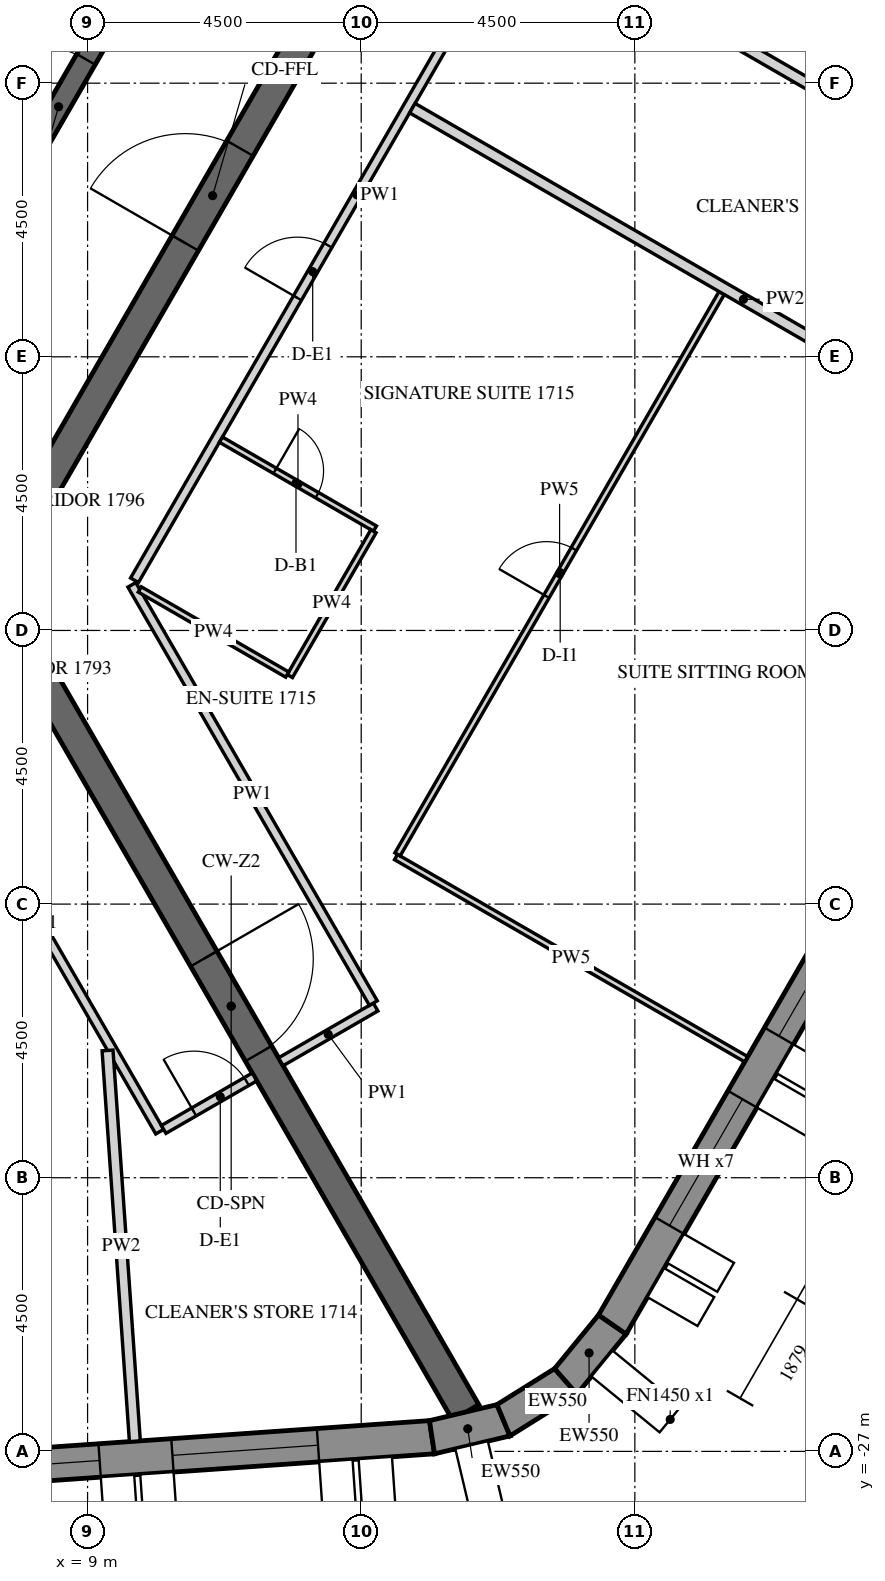
"""IFC4 building model, lengths in metres.
Left out: names, types, materials, properties, quantities, classifications, styles, units other than length and angle.
Written with IfcOpenShell. Run it as: python <this file> out.ifc"""

import sys

from ifc_helpers import new_model, si_unit, direction, frame, frame_2d, origin, place, context, subcontext, project, spatial, polyline, rectangle, outline, extrude, element, fill, save


model = new_model("IFC4")
c1 = context("Model", 3, precision=1e-05, world=origin(), true_north=direction((0.0, 1.0)))
c2 = subcontext(c1, "Body", "Model", "MODEL_VIEW")
j1 = project(units=[si_unit("LENGTHUNIT", "METRE"), si_unit("PLANEANGLEUNIT", "RADIAN")], contexts=[c1])
p1 = place(None, origin())
s1 = spatial("IfcSite", under=j1, at=p1, CompositionType="ELEMENT")
p2 = place(p1, origin())
s2 = spatial("IfcBuilding", under=s1, at=p2, CompositionType="ELEMENT")
p3 = place(p2, frame((0.0, 0.0, 215.1)))
s3 = spatial("IfcBuildingStorey", under=s2, at=p3, CompositionType="ELEMENT", Elevation=215.1)
p4 = place(p3, frame((-13.026, -28.704, -0.15), z_axis=(0.0, 0.0, 1.0), x_axis=(0.99756406806, 0.069756219185, 0.0)))
e1 = element("IfcWall", 1, at=p4, inside=s3, PredefinedType="SOLIDWALL", context=c2, shape_type="SweptSolid", body=[
    extrude(outline(polyline([(-0.026, -0.275), (27.78, -0.275), (27.735, 0.275), (0.026, 0.275), (-0.026, -0.275)])), origin(), (0.0, 0.0, 1.0), 3.9),
])
p5 = place(p4, frame((1.879, 0.0, 1.05)))
e2 = element("IfcOpeningElement", 2, at=p5, cuts=e1, PredefinedType="OPENING", context=c2, shape_type="SweptSolid", body=[
    extrude(rectangle(XDim=2.4, YDim=2.4, at=frame_2d((1.2, 1.2))), frame((0.0, 0.285, 0.0), z_axis=(0.0, -1.0, 0.0), x_axis=(1.0, 0.0, 0.0)), (0.0, 0.0, 1.0), 0.57),
])
p6 = place(p4, frame((5.479, 0.0, 1.05)))
e3 = element("IfcOpeningElement", 3, at=p6, cuts=e1, PredefinedType="OPENING", context=c2, shape_type="SweptSolid", body=[
    extrude(rectangle(XDim=2.4, YDim=2.4, at=frame_2d((1.2, 1.2))), frame((0.0, 0.285, 0.0), z_axis=(0.0, -1.0, 0.0), x_axis=(1.0, 0.0, 0.0)), (0.0, 0.0, 1.0), 0.57),
])
p7 = place(p4, frame((9.079, 0.0, 1.05)))
e4 = element("IfcOpeningElement", 4, at=p7, cuts=e1, PredefinedType="OPENING", context=c2, shape_type="SweptSolid", body=[
    extrude(rectangle(XDim=2.4, YDim=2.4, at=frame_2d((1.2, 1.2))), frame((0.0, 0.285, 0.0), z_axis=(0.0, -1.0, 0.0), x_axis=(1.0, 0.0, 0.0)), (0.0, 0.0, 1.0), 0.57),
])
p8 = place(p4, frame((12.679, 0.0, 1.05)))
e5 = element("IfcOpeningElement", 5, at=p8, cuts=e1, PredefinedType="OPENING", context=c2, shape_type="SweptSolid", body=[
    extrude(rectangle(XDim=2.4, YDim=2.4, at=frame_2d((1.2, 1.2))), frame((0.0, 0.285, 0.0), z_axis=(0.0, -1.0, 0.0), x_axis=(1.0, 0.0, 0.0)), (0.0, 0.0, 1.0), 0.57),
])
p9 = place(p4, frame((16.279, 0.0, 1.05)))
e6 = element("IfcOpeningElement", 6, at=p9, cuts=e1, PredefinedType="OPENING", context=c2, shape_type="SweptSolid", body=[
    extrude(rectangle(XDim=2.4, YDim=2.4, at=frame_2d((1.2, 1.2))), frame((0.0, 0.285, 0.0), z_axis=(0.0, -1.0, 0.0), x_axis=(1.0, 0.0, 0.0)), (0.0, 0.0, 1.0), 0.57),
])
p10 = place(p4, frame((19.879, 0.0, 1.05)))
e7 = element("IfcOpeningElement", 7, at=p10, cuts=e1, PredefinedType="OPENING", context=c2, shape_type="SweptSolid", body=[
    extrude(rectangle(XDim=2.4, YDim=2.4, at=frame_2d((1.2, 1.2))), frame((0.0, 0.285, 0.0), z_axis=(0.0, -1.0, 0.0), x_axis=(1.0, 0.0, 0.0)), (0.0, 0.0, 1.0), 0.57),
])
p11 = place(p4, frame((23.479, 0.0, 1.05)))
e8 = element("IfcOpeningElement", 8, at=p11, cuts=e1, PredefinedType="OPENING", context=c2, shape_type="SweptSolid", body=[
    extrude(rectangle(XDim=2.4, YDim=2.4, at=frame_2d((1.2, 1.2))), frame((0.0, 0.285, 0.0), z_axis=(0.0, -1.0, 0.0), x_axis=(1.0, 0.0, 0.0)), (0.0, 0.0, 1.0), 0.57),
])
p12 = place(p3, frame((14.664, -26.767, -0.15), z_axis=(0.0, 0.0, 1.0), x_axis=(0.973063591128, 0.230536868247, 0.0)))
e9 = element("IfcWall", 9, at=p12, inside=s3, PredefinedType="SOLIDWALL", context=c2, shape_type="SweptSolid", body=[
    extrude(outline(polyline([(-0.022, -0.275), (1.253, -0.275), (1.163, 0.275), (0.022, 0.275), (-0.022, -0.275)])), origin(), (0.0, 0.0, 1.0), 3.9),
])
p13 = place(p3, frame((15.84, -26.489, -0.15), z_axis=(0.0, 0.0, 1.0), x_axis=(0.848009655012, 0.52998077796, 0.0)))
e10 = element("IfcWall", 10, at=p13, inside=s3, PredefinedType="SOLIDWALL", context=c2, shape_type="SweptSolid", body=[
    extrude(outline(polyline([(-0.045, -0.275), (1.253, -0.275), (1.163, 0.275), (0.045, 0.275), (-0.045, -0.275)])), origin(), (0.0, 0.0, 1.0), 3.9),
])
p14 = place(p3, frame((16.864, -25.848, -0.15), z_axis=(0.0, 0.0, 1.0), x_axis=(0.633842757806, 0.773461930787, 0.0)))
e11 = element("IfcWall", 11, at=p14, inside=s3, PredefinedType="SOLIDWALL", context=c2, shape_type="SweptSolid", body=[
    extrude(outline(polyline([(-0.045, -0.275), (1.231, -0.275), (1.186, 0.275), (0.045, 0.275), (-0.045, -0.275)])), origin(), (0.0, 0.0, 1.0), 3.9),
])
p15 = place(p3, frame((17.63, -24.914, -0.15), z_axis=(0.0, 0.0, 1.0), x_axis=(0.499998569178, 0.866026229868, 0.0)))
e12 = element("IfcWall", 12, at=p15, inside=s3, PredefinedType="SOLIDWALL", context=c2, shape_type="SweptSolid", body=[
    extrude(outline(polyline([(-0.022, -0.275), (27.783, -0.275), (27.732, 0.275), (0.022, 0.275), (-0.022, -0.275)])), origin(), (0.0, 0.0, 1.0), 3.9),
])
p16 = place(p15, frame((1.879, 0.0, 1.05)))
e13 = element("IfcOpeningElement", 13, at=p16, cuts=e12, PredefinedType="OPENING", context=c2, shape_type="SweptSolid", body=[
    extrude(rectangle(XDim=2.4, YDim=2.4, at=frame_2d((1.2, 1.2))), frame((0.0, 0.285, 0.0), z_axis=(0.0, -1.0, 0.0), x_axis=(1.0, 0.0, 0.0)), (0.0, 0.0, 1.0), 0.57),
])
p17 = place(p15, frame((5.479, 0.0, 1.05)))
e14 = element("IfcOpeningElement", 14, at=p17, cuts=e12, PredefinedType="OPENING", context=c2, shape_type="SweptSolid", body=[
    extrude(rectangle(XDim=2.4, YDim=2.4, at=frame_2d((1.2, 1.2))), frame((0.0, 0.285, 0.0), z_axis=(0.0, -1.0, 0.0), x_axis=(1.0, 0.0, 0.0)), (0.0, 0.0, 1.0), 0.57),
])
p18 = place(p15, frame((9.079, 0.0, 1.05)))
e15 = element("IfcOpeningElement", 15, at=p18, cuts=e12, PredefinedType="OPENING", context=c2, shape_type="SweptSolid", body=[
    extrude(rectangle(XDim=2.4, YDim=2.4, at=frame_2d((1.2, 1.2))), frame((0.0, 0.285, 0.0), z_axis=(0.0, -1.0, 0.0), x_axis=(1.0, 0.0, 0.0)), (0.0, 0.0, 1.0), 0.57),
])
p19 = place(p15, frame((12.679, 0.0, 1.05)))
e16 = element("IfcOpeningElement", 16, at=p19, cuts=e12, PredefinedType="OPENING", context=c2, shape_type="SweptSolid", body=[
    extrude(rectangle(XDim=2.4, YDim=2.4, at=frame_2d((1.2, 1.2))), frame((0.0, 0.285, 0.0), z_axis=(0.0, -1.0, 0.0), x_axis=(1.0, 0.0, 0.0)), (0.0, 0.0, 1.0), 0.57),
])
p20 = place(p15, frame((16.279, 0.0, 1.05)))
e17 = element("IfcOpeningElement", 17, at=p20, cuts=e12, PredefinedType="OPENING", context=c2, shape_type="SweptSolid", body=[
    extrude(rectangle(XDim=2.4, YDim=2.4, at=frame_2d((1.2, 1.2))), frame((0.0, 0.285, 0.0), z_axis=(0.0, -1.0, 0.0), x_axis=(1.0, 0.0, 0.0)), (0.0, 0.0, 1.0), 0.57),
])
p21 = place(p15, frame((19.879, 0.0, 1.05)))
e18 = element("IfcOpeningElement", 18, at=p21, cuts=e12, PredefinedType="OPENING", context=c2, shape_type="SweptSolid", body=[
    extrude(rectangle(XDim=2.4, YDim=2.4, at=frame_2d((1.2, 1.2))), frame((0.0, 0.285, 0.0), z_axis=(0.0, -1.0, 0.0), x_axis=(1.0, 0.0, 0.0)), (0.0, 0.0, 1.0), 0.57),
])
p22 = place(p15, frame((23.479, 0.0, 1.05)))
e19 = element("IfcOpeningElement", 19, at=p22, cuts=e12, PredefinedType="OPENING", context=c2, shape_type="SweptSolid", body=[
    extrude(rectangle(XDim=2.4, YDim=2.4, at=frame_2d((1.2, 1.2))), frame((0.0, 0.285, 0.0), z_axis=(0.0, -1.0, 0.0), x_axis=(1.0, 0.0, 0.0)), (0.0, 0.0, 1.0), 0.57),
])
p23 = place(p3, frame((7.361, -12.75, -0.15), z_axis=(0.0, 0.0, 1.0), x_axis=(0.50000571537, 0.866022103989, 0.0)))
e20 = element("IfcWall", 20, at=p23, inside=s3, PredefinedType="SHEAR", context=c2, shape_type="SweptSolid", body=[
    extrude(outline(polyline([(-0.144, -0.25), (14.867, -0.25), (14.578, 0.25), (0.144, 0.25), (-0.144, -0.25)])), origin(), (0.0, 0.0, 1.0), 3.9),
])
p24 = place(p23, frame((6.49, 0.0, 0.15)))
e21 = element("IfcOpeningElement", 21, at=p24, cuts=e20, PredefinedType="OPENING", context=c2, shape_type="SweptSolid", body=[
    extrude(rectangle(XDim=1.8, YDim=2.4, at=frame_2d((0.9, 1.2))), frame((0.0, 0.26, 0.0), z_axis=(0.0, -1.0, 0.0), x_axis=(1.0, 0.0, 0.0)), (0.0, 0.0, 1.0), 0.52),
])
p25 = place(p3, frame((7.506, -13.0, -0.15), z_axis=(0.0, 0.0, 1.0), x_axis=(0.499988271576, -0.866032175087, 0.0)))
e22 = element("IfcWall", 22, at=p25, inside=s3, PredefinedType="SHEAR", context=c2, shape_type="SweptSolid", body=[
    extrude(rectangle(XDim=15.424, YDim=0.5, at=frame_2d((7.712, 0.0))), origin(), (0.0, 0.0, 1.0), 3.9),
])
p26 = place(p25, frame((6.812, 0.0, 0.15)))
e23 = element("IfcOpeningElement", 23, at=p26, cuts=e22, PredefinedType="OPENING", context=c2, shape_type="SweptSolid", body=[
    extrude(rectangle(XDim=1.8, YDim=2.4, at=frame_2d((0.9, 1.2))), frame((0.0, 0.26, 0.0), z_axis=(0.0, -1.0, 0.0), x_axis=(1.0, 0.0, 0.0)), (0.0, 0.0, 1.0), 0.52),
])
p27 = place(p3, frame((5.673, -9.825, -0.15), z_axis=(0.0, 0.0, 1.0), x_axis=(0.499995046907, 0.866028263435, 0.0)))
e24 = element("IfcWall", 24, at=p27, inside=s3, PredefinedType="SHEAR", context=c2, shape_type="SweptSolid", body=[
    extrude(outline(polyline([(-0.101, -0.175), (11.446, -0.175), (11.244, 0.175), (0.101, 0.175), (-0.101, -0.175)])), origin(), (0.0, 0.0, 1.0), 3.9),
])
p28 = place(p27, frame((4.801, 0.0, 0.15)))
e25 = element("IfcOpeningElement", 25, at=p28, cuts=e24, PredefinedType="OPENING", context=c2, shape_type="SweptSolid", body=[
    extrude(rectangle(XDim=1.8, YDim=2.4, at=frame_2d((0.9, 1.2))), frame((0.0, 0.185, 0.0), z_axis=(0.0, -1.0, 0.0), x_axis=(1.0, 0.0, 0.0)), (0.0, 0.0, 1.0), 0.37),
])
p29 = place(p3, frame((6.221, -14.875, 0.0), z_axis=(0.0, 0.0, 1.0), x_axis=(0.499989830942, -0.866031274813, 0.0)))
e26 = element("IfcWall", 26, at=p29, inside=s3, PredefinedType="PARTITIONING", context=c2, shape_type="SweptSolid", body=[
    extrude(rectangle(XDim=7.93, YDim=0.15, at=frame_2d((3.965, 0.0))), origin(), (0.0, 0.0, 1.0), 2.988),
])
p30 = place(p3, frame((10.251, -21.705, 0.0), z_axis=(0.0, 0.0, 1.0), x_axis=(0.866013532718, 0.500020560727, 0.0)))
e27 = element("IfcWall", 27, at=p30, inside=s3, PredefinedType="PARTITIONING", context=c2, shape_type="SweptSolid", body=[
    extrude(rectangle(XDim=1.725, YDim=0.15, at=frame_2d((0.863, 0.0))), origin(), (0.0, 0.0, 1.0), 2.988),
])
p31 = place(p30, frame((0.575, 0.0, 0.0)))
e28 = element("IfcOpeningElement", 28, at=p31, cuts=e27, PredefinedType="OPENING", context=c2, shape_type="SweptSolid", body=[
    extrude(rectangle(XDim=1.0, YDim=2.1, at=frame_2d((0.5, 1.05))), frame((0.0, 0.085, 0.0), z_axis=(0.0, -1.0, 0.0), x_axis=(1.0, 0.0, 0.0)), (0.0, 0.0, 1.0), 0.17),
])
p32 = place(p3, frame((12.178, -20.593, 0.0), z_axis=(0.0, 0.0, 1.0), x_axis=(0.866047807691, 0.499961193289, 0.0)))
e29 = element("IfcWall", 29, at=p32, inside=s3, PredefinedType="PARTITIONING", context=c2, shape_type="SweptSolid", body=[
    extrude(rectangle(XDim=1.8, YDim=0.15, at=frame_2d((0.9, 0.0))), origin(), (0.0, 0.0, 1.0), 2.988),
])
p33 = place(p3, frame((13.699, -19.628, 0.0), z_axis=(0.0, 0.0, 1.0), x_axis=(-0.499997422768, 0.866026891745, 0.0)))
e30 = element("IfcWall", 30, at=p33, inside=s3, PredefinedType="PARTITIONING", context=c2, shape_type="SweptSolid", body=[
    extrude(rectangle(XDim=7.942, YDim=0.15, at=frame_2d((3.971, 0.0))), origin(), (0.0, 0.0, 1.0), 2.988),
])
p34 = place(p3, frame((9.772, -12.675, 0.0), z_axis=(0.0, 0.0, 1.0), x_axis=(0.499996322767, 0.866027526826, 0.0)))
e31 = element("IfcWall", 31, at=p34, inside=s3, PredefinedType="PARTITIONING", context=c2, shape_type="SweptSolid", body=[
    extrude(rectangle(XDim=14.636, YDim=0.15, at=frame_2d((7.318, 0.0))), origin(), (0.0, 0.0, 1.0), 2.988),
])
p35 = place(p34, frame((5.361, 0.0, 0.0)))
e32 = element("IfcOpeningElement", 32, at=p35, cuts=e31, PredefinedType="OPENING", context=c2, shape_type="SweptSolid", body=[
    extrude(rectangle(XDim=1.0, YDim=2.1, at=frame_2d((0.5, 1.05))), frame((0.0, 0.085, 0.0), z_axis=(0.0, -1.0, 0.0), x_axis=(1.0, 0.0, 0.0)), (0.0, 0.0, 1.0), 0.17),
])
p36 = place(p34, frame((10.309, 0.0, 0.0)))
e33 = element("IfcOpeningElement", 33, at=p36, cuts=e31, PredefinedType="OPENING", context=c2, shape_type="SweptSolid", body=[
    extrude(rectangle(XDim=1.0, YDim=2.1, at=frame_2d((0.5, 1.05))), frame((0.0, 0.085, 0.0), z_axis=(0.0, -1.0, 0.0), x_axis=(1.0, 0.0, 0.0)), (0.0, 0.0, 1.0), 0.17),
])
p37 = place(p34, frame((13.278, 0.0, 0.0)))
e34 = element("IfcOpeningElement", 34, at=p37, cuts=e31, PredefinedType="OPENING", context=c2, shape_type="SweptSolid", body=[
    extrude(rectangle(XDim=1.0, YDim=2.1, at=frame_2d((0.5, 1.05))), frame((0.0, 0.085, 0.0), z_axis=(0.0, -1.0, 0.0), x_axis=(1.0, 0.0, 0.0)), (0.0, 0.0, 1.0), 0.17),
])
p38 = place(p3, frame((9.778, -26.833, 0.0), z_axis=(0.0, 0.0, 1.0), x_axis=(-0.069733334443, 0.997565668048, 0.0)))
e35 = element("IfcWall", 35, at=p38, inside=s3, PredefinedType="PARTITIONING", context=c2, shape_type="SweptSolid", body=[
    extrude(rectangle(XDim=6.442, YDim=0.18, at=frame_2d((3.221, 0.0))), origin(), (0.0, 0.0, 1.0), 2.988),
])
p39 = place(p3, frame((11.193, -10.363, 0.0), z_axis=(0.0, 0.0, 1.0), x_axis=(0.865989585315, -0.500062034277, 0.0)))
e36 = element("IfcWall", 36, at=p39, inside=s3, PredefinedType="PARTITIONING", context=c2, shape_type="SweptSolid", body=[
    extrude(rectangle(XDim=2.925, YDim=0.1, at=frame_2d((1.462, 0.0))), origin(), (0.0, 0.0, 1.0), 2.988),
])
p40 = place(p39, frame((1.025, 0.0, 0.0)))
e37 = element("IfcOpeningElement", 37, at=p40, cuts=e36, PredefinedType="OPENING", context=c2, shape_type="SweptSolid", body=[
    extrude(rectangle(XDim=0.8, YDim=2.1, at=frame_2d((0.4, 1.05))), frame((0.0, 0.06, 0.0), z_axis=(0.0, -1.0, 0.0), x_axis=(1.0, 0.0, 0.0)), (0.0, 0.0, 1.0), 0.12),
])
p41 = place(p3, frame((13.701, -11.868, 0.0), z_axis=(0.0, 0.0, 1.0), x_axis=(-0.499996545922, -0.866027397988, 0.0)))
e38 = element("IfcWall", 38, at=p41, inside=s3, PredefinedType="PARTITIONING", context=c2, shape_type="SweptSolid", body=[
    extrude(rectangle(XDim=2.75, YDim=0.1, at=frame_2d((1.375, 0.0))), origin(), (0.0, 0.0, 1.0), 2.988),
])
p42 = place(p3, frame((12.283, -14.225, 0.0), z_axis=(0.0, 0.0, 1.0), x_axis=(-0.866018616679, 0.500011755427, 0.0)))
e39 = element("IfcWall", 39, at=p42, inside=s3, PredefinedType="PARTITIONING", context=c2, shape_type="SweptSolid", body=[
    extrude(rectangle(XDim=2.8, YDim=0.1, at=frame_2d((1.4, 0.0))), origin(), (0.0, 0.0, 1.0), 2.988),
])
p43 = place(p3, frame((19.831, -20.551, 0.0), z_axis=(0.0, 0.0, 1.0), x_axis=(-0.866027239912, 0.49999681972, 0.0)))
e40 = element("IfcWall", 40, at=p43, inside=s3, PredefinedType="PARTITIONING", context=c2, shape_type="SweptSolid", body=[
    extrude(rectangle(XDim=6.65, YDim=0.1, at=frame_2d((3.325, 0.0))), origin(), (0.0, 0.0, 1.0), 2.988),
])
p44 = place(p3, frame((14.097, -17.183, 0.0), z_axis=(0.0, 0.0, 1.0), x_axis=(0.500001321243, 0.866024640963, 0.0)))
e41 = element("IfcWall", 41, at=p44, inside=s3, PredefinedType="PARTITIONING", context=c2, shape_type="SweptSolid", body=[
    extrude(rectangle(XDim=10.66, YDim=0.1, at=frame_2d((5.33, 0.0))), origin(), (0.0, 0.0, 1.0), 2.988),
])
p45 = place(p44, frame((4.9, 0.0, 0.0)))
e42 = element("IfcOpeningElement", 42, at=p45, cuts=e41, PredefinedType="OPENING", context=c2, shape_type="SweptSolid", body=[
    extrude(rectangle(XDim=0.9, YDim=2.1, at=frame_2d((0.45, 1.05))), frame((0.0, 0.06, 0.0), z_axis=(0.0, -1.0, 0.0), x_axis=(1.0, 0.0, 0.0)), (0.0, 0.0, 1.0), 0.12),
])
p46 = place(p3, frame((25.231, -11.198, 0.0), z_axis=(0.0, 0.0, 1.0), x_axis=(-0.866032662629, 0.499987427101, 0.0)))
e43 = element("IfcWall", 43, at=p46, inside=s3, PredefinedType="PARTITIONING", context=c2, shape_type="SweptSolid", body=[
    extrude(rectangle(XDim=12.575, YDim=0.18, at=frame_2d((6.288, 0.0))), origin(), (0.0, 0.0, 1.0), 2.988),
])
p47 = place(p3, frame((27.031, -8.08, 0.0), z_axis=(0.0, 0.0, 1.0), x_axis=(-0.86602780907, 0.499995833901, 0.0)))
e44 = element("IfcWall", 44, at=p47, inside=s3, PredefinedType="PARTITIONING", context=c2, shape_type="SweptSolid", body=[
    extrude(rectangle(XDim=12.575, YDim=0.18, at=frame_2d((6.287, 0.0))), origin(), (0.0, 0.0, 1.0), 2.988),
])
p48 = place(p10, frame((0.0, 0.205, 0.0)))
e45 = element("IfcWindow", 45, at=p48, inside=s3, PartitioningType="DOUBLE_PANEL_VERTICAL", PredefinedType="WINDOW", context=c2, shape_type="SweptSolid", body=[
    extrude(rectangle(XDim=2.4, YDim=2.4, at=frame_2d((1.2, 1.2))), frame((0.0, 0.03, 0.0), z_axis=(0.0, -1.0, 0.0), x_axis=(1.0, 0.0, 0.0)), (0.0, 0.0, 1.0), 0.06),
])
fill(e7, e45)
p49 = place(p11, frame((0.0, 0.205, 0.0)))
e46 = element("IfcWindow", 46, at=p49, inside=s3, PartitioningType="DOUBLE_PANEL_VERTICAL", PredefinedType="WINDOW", context=c2, shape_type="SweptSolid", body=[
    extrude(rectangle(XDim=2.4, YDim=2.4, at=frame_2d((1.2, 1.2))), frame((0.0, 0.03, 0.0), z_axis=(0.0, -1.0, 0.0), x_axis=(1.0, 0.0, 0.0)), (0.0, 0.0, 1.0), 0.06),
])
fill(e8, e46)
p50 = place(p16, frame((0.0, 0.205, 0.0)))
e47 = element("IfcWindow", 47, at=p50, inside=s3, PartitioningType="DOUBLE_PANEL_VERTICAL", PredefinedType="WINDOW", context=c2, shape_type="SweptSolid", body=[
    extrude(rectangle(XDim=2.4, YDim=2.4, at=frame_2d((1.2, 1.2))), frame((0.0, 0.03, 0.0), z_axis=(0.0, -1.0, 0.0), x_axis=(1.0, 0.0, 0.0)), (0.0, 0.0, 1.0), 0.06),
])
fill(e13, e47)
p51 = place(p17, frame((0.0, 0.205, 0.0)))
e48 = element("IfcWindow", 48, at=p51, inside=s3, PartitioningType="DOUBLE_PANEL_VERTICAL", PredefinedType="WINDOW", context=c2, shape_type="SweptSolid", body=[
    extrude(rectangle(XDim=2.4, YDim=2.4, at=frame_2d((1.2, 1.2))), frame((0.0, 0.03, 0.0), z_axis=(0.0, -1.0, 0.0), x_axis=(1.0, 0.0, 0.0)), (0.0, 0.0, 1.0), 0.06),
])
fill(e14, e48)
p52 = place(p24, origin())
e49 = element("IfcDoor", 49, at=p52, inside=s3, OperationType="DOUBLE_DOOR_SINGLE_SWING", PredefinedType="DOOR", context=c2, shape_type="SweptSolid", body=[
    extrude(rectangle(XDim=1.8, YDim=2.4, at=frame_2d((0.9, 1.2))), frame((0.0, 0.025, 0.0), z_axis=(0.0, -1.0, 0.0), x_axis=(1.0, 0.0, 0.0)), (0.0, 0.0, 1.0), 0.05),
])
fill(e21, e49)
p53 = place(p26, origin())
e50 = element("IfcDoor", 50, at=p53, inside=s3, OperationType="DOUBLE_DOOR_SINGLE_SWING", PredefinedType="DOOR", context=c2, shape_type="SweptSolid", body=[
    extrude(rectangle(XDim=1.8, YDim=2.4, at=frame_2d((0.9, 1.2))), frame((0.0, 0.025, 0.0), z_axis=(0.0, -1.0, 0.0), x_axis=(1.0, 0.0, 0.0)), (0.0, 0.0, 1.0), 0.05),
])
fill(e23, e50)
p54 = place(p28, origin())
e51 = element("IfcDoor", 51, at=p54, inside=s3, OperationType="DOUBLE_DOOR_SINGLE_SWING", PredefinedType="DOOR", context=c2, shape_type="SweptSolid", body=[
    extrude(rectangle(XDim=1.8, YDim=2.4, at=frame_2d((0.9, 1.2))), frame((0.0, 0.025, 0.0), z_axis=(0.0, -1.0, 0.0), x_axis=(1.0, 0.0, 0.0)), (0.0, 0.0, 1.0), 0.05),
])
fill(e25, e51)
p55 = place(p31, origin())
e52 = element("IfcDoor", 52, at=p55, inside=s3, OperationType="SINGLE_SWING_LEFT", PredefinedType="DOOR", context=c2, shape_type="SweptSolid", body=[
    extrude(rectangle(XDim=1.0, YDim=2.1, at=frame_2d((0.5, 1.05))), frame((0.0, 0.025, 0.0), z_axis=(0.0, -1.0, 0.0), x_axis=(1.0, 0.0, 0.0)), (0.0, 0.0, 1.0), 0.05),
])
fill(e28, e52)
p56 = place(p35, origin())
e53 = element("IfcDoor", 53, at=p56, inside=s3, OperationType="SINGLE_SWING_LEFT", PredefinedType="DOOR", context=c2, shape_type="SweptSolid", body=[
    extrude(rectangle(XDim=1.0, YDim=2.1, at=frame_2d((0.5, 1.05))), frame((0.0, 0.025, 0.0), z_axis=(0.0, -1.0, 0.0), x_axis=(1.0, 0.0, 0.0)), (0.0, 0.0, 1.0), 0.05),
])
fill(e32, e53)
p57 = place(p40, origin())
e54 = element("IfcDoor", 54, at=p57, inside=s3, OperationType="SINGLE_SWING_RIGHT", PredefinedType="DOOR", context=c2, shape_type="SweptSolid", body=[
    extrude(rectangle(XDim=0.8, YDim=2.1, at=frame_2d((0.4, 1.05))), frame((0.0, 0.025, 0.0), z_axis=(0.0, -1.0, 0.0), x_axis=(1.0, 0.0, 0.0)), (0.0, 0.0, 1.0), 0.05),
])
fill(e37, e54)
p58 = place(p45, origin())
e55 = element("IfcDoor", 55, at=p58, inside=s3, OperationType="SINGLE_SWING_LEFT", PredefinedType="DOOR", context=c2, shape_type="SweptSolid", body=[
    extrude(rectangle(XDim=0.9, YDim=2.1, at=frame_2d((0.45, 1.05))), frame((0.0, 0.025, 0.0), z_axis=(0.0, -1.0, 0.0), x_axis=(1.0, 0.0, 0.0)), (0.0, 0.0, 1.0), 0.05),
])
fill(e42, e55)
save(model, sys.argv[1])
